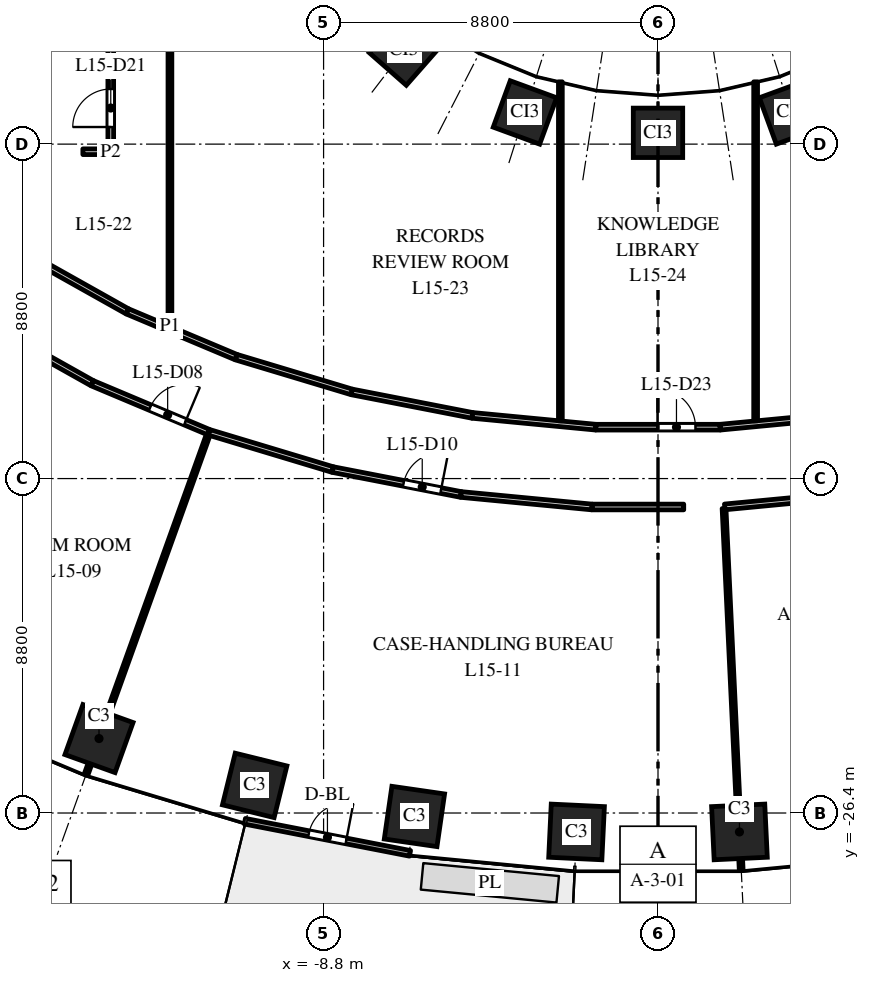
"""IFC4 building model, lengths in metres.
Left out: names, types, materials, properties, quantities, classifications, styles, units other than length and angle.
Written with IfcOpenShell. Run it as: python <this file> out.ifc"""

import sys

from ifc_helpers import new_model, si_unit, direction, frame, frame_2d, origin, origin_2d, place, context, subcontext, project, spatial, rectangle, extrude, element, fill, save


model = new_model("IFC4")
c1 = context("Model", 3, precision=1e-05, world=origin(), true_north=direction((0.0, 1.0)))
c2 = subcontext(c1, "Body", "Model", "MODEL_VIEW")
j1 = project(units=[si_unit("LENGTHUNIT", "METRE"), si_unit("PLANEANGLEUNIT", "RADIAN")], contexts=[c1])
p1 = place(None, origin())
s1 = spatial("IfcSite", under=j1, at=p1, CompositionType="ELEMENT")
p2 = place(p1, origin())
s2 = spatial("IfcBuilding", under=s1, at=p2, CompositionType="ELEMENT")
p3 = place(p2, frame((0.0, 0.0, 70.5)))
s3 = spatial("IfcBuildingStorey", under=s2, at=p3, CompositionType="ELEMENT", Elevation=70.5)
for number, where, z_axis, x_axis in (
    (1, (-14.709, -24.441, 0.0), (0.0, 0.0, 1.0), (0.941, -0.338, 0.0)),
    (2, (-10.613, -25.674, 0.0), (0.0, 0.0, 1.0), (0.971, -0.24, 0.0)),
    (3, (-6.409, -26.491, 0.0), (0.0, 0.0, 1.0), (0.99, -0.143, 0.0)),
    (4, (-2.143, -26.898, 0.0), (0.0, 0.0, 1.0), (0.999, -0.048, 0.0)),
    (5, (2.143, -26.898, 0.0), (0.0, 0.0, 1.0), (0.999, 0.048, 0.0)),
):
    element("IfcColumn", number, at=place(p3, frame(where, z_axis=z_axis, x_axis=x_axis)), inside=s3, PredefinedType="COLUMN", context=c2, shape_type="SweptSolid", body=[
        extrude(rectangle(XDim=1.4, YDim=1.4, at=origin_2d()), origin(), (0.0, 0.0, 1.0), 4.0),
    ])
for number, where, z_axis, x_axis in (
    (6, (-6.682, -6.334, 0.0), (0.0, 0.0, 1.0), (0.751, -0.66, 0.0)),
    (7, (-3.501, -7.967, 0.0), (0.0, 0.0, 1.0), (0.939, -0.344, 0.0)),
    (8, (0.0, -8.503, 0.0), (0.0, 0.0, 1.0), (1.0, 0.0, 0.0)),
    (9, (3.501, -7.967, 0.0), (0.0, 0.0, 1.0), (0.939, 0.344, 0.0)),
):
    element("IfcColumn", number, at=place(p3, frame(where, z_axis=z_axis, x_axis=x_axis)), inside=s3, PredefinedType="COLUMN", context=c2, shape_type="SweptSolid", body=[
        extrude(rectangle(XDim=1.3, YDim=1.3, at=origin_2d()), origin(), (0.0, 0.0, 1.0), 4.0),
    ])
p4 = place(p3, frame((-10.871, -26.617, 0.0), z_axis=(0.0, 0.0, 1.0), x_axis=(0.981631174778, -0.190788460615, 0.0)))
e10 = element("IfcWall", 10, at=p4, inside=s3, PredefinedType="STANDARD", context=c2, shape_type="SweptSolid", body=[
    extrude(rectangle(XDim=4.426, YDim=0.15, at=frame_2d((2.213, 0.0))), origin(), (0.0, 0.0, 1.0), 3.7),
])
p5 = place(p4, frame((1.713, 0.0, 0.0)))
e11 = element("IfcOpeningElement", 11, at=p5, cuts=e10, PredefinedType="OPENING", context=c2, shape_type="SweptSolid", body=[
    extrude(rectangle(XDim=1.0, YDim=2.4, at=frame_2d((0.5, 1.2))), frame((0.0, 0.085, 0.0), z_axis=(0.0, -1.0, 0.0), x_axis=(1.0, 0.0, 0.0)), (0.0, 0.0, 1.0), 0.17),
])
p6 = place(p3, frame((-17.699, -13.513, 0.0), z_axis=(0.0, 0.0, 1.0), x_axis=(0.872072163686, -0.489377299559, 0.0)))
e12 = element("IfcWall", 12, at=p6, inside=s3, PredefinedType="PARTITIONING", context=c2, shape_type="SweptSolid", body=[
    extrude(rectangle(XDim=3.227, YDim=0.15, at=frame_2d((1.613, 0.0))), origin(), (0.0, 0.0, 1.0), 3.7),
])
p7 = place(p3, frame((-16.576, -11.735, 0.0), z_axis=(0.0, 0.0, 1.0), x_axis=(0.872164226045, -0.489213207924, 0.0)))
e13 = element("IfcWall", 13, at=p7, inside=s3, PredefinedType="PARTITIONING", context=c2, shape_type="SweptSolid", body=[
    extrude(rectangle(XDim=2.998, YDim=0.15, at=frame_2d((1.499, 0.0))), origin(), (0.0, 0.0, 1.0), 2.75),
])
p8 = place(p3, frame((-15.134, -9.0, 0.0), z_axis=(0.0, 0.0, 1.0), x_axis=(1.0, 0.0, 0.0)))
e14 = element("IfcWall", 14, at=p8, inside=s3, PredefinedType="PARTITIONING", context=c2, shape_type="SweptSolid", body=[
    extrude(rectangle(XDim=0.734, YDim=0.15, at=frame_2d((0.367, 0.0))), origin(), (0.0, 0.0, 1.0), 3.7),
])
p9 = place(p3, frame((-15.048, -25.383, 0.0), z_axis=(0.0, 0.0, 1.0), x_axis=(0.338338680362, 0.941024408488, 0.0)))
e15 = element("IfcWall", 15, at=p9, inside=s3, PredefinedType="PARTITIONING", context=c2, shape_type="SweptSolid", body=[
    extrude(rectangle(XDim=9.559, YDim=0.1, at=frame_2d((4.779, 0.0))), origin(), (0.0, 0.0, 1.0), 2.85),
])
p10 = place(p3, frame((-14.885, -15.092, 0.0), z_axis=(0.0, 0.0, 1.0), x_axis=(0.921844706698, -0.387559462189, 0.0)))
e16 = element("IfcWall", 16, at=p10, inside=s3, PredefinedType="PARTITIONING", context=c2, shape_type="SweptSolid", body=[
    extrude(rectangle(XDim=3.313, YDim=0.15, at=frame_2d((1.656, 0.0))), origin(), (0.0, 0.0, 1.0), 2.85),
])
p11 = place(p10, frame((1.65, 0.0, 0.0)))
e17 = element("IfcOpeningElement", 17, at=p11, cuts=e16, PredefinedType="OPENING", context=c2, shape_type="SweptSolid", body=[
    extrude(rectangle(XDim=1.0, YDim=2.1, at=frame_2d((0.5, 1.05))), frame((0.0, 0.085, 0.0), z_axis=(0.0, -1.0, 0.0), x_axis=(1.0, 0.0, 0.0)), (0.0, 0.0, 1.0), 0.17),
])
p12 = place(p3, frame((-14.4, -9.0, 0.0), z_axis=(0.0, 0.0, 1.0), x_axis=(0.0, 1.0, 0.0)))
e18 = element("IfcWall", 18, at=p12, inside=s3, PredefinedType="PARTITIONING", context=c2, shape_type="SweptSolid", body=[
    extrude(rectangle(XDim=18.0, YDim=0.15, at=frame_2d((9.0, 0.0))), origin(), (0.0, 0.0, 1.0), 3.7),
])
p13 = place(p12, frame((0.65, 0.0, 0.0)))
e19 = element("IfcOpeningElement", 19, at=p13, cuts=e18, PredefinedType="OPENING", context=c2, shape_type="SweptSolid", body=[
    extrude(rectangle(XDim=1.0, YDim=2.1, at=frame_2d((0.5, 1.05))), frame((0.0, 0.085, 0.0), z_axis=(0.0, -1.0, 0.0), x_axis=(1.0, 0.0, 0.0)), (0.0, 0.0, 1.0), 0.17),
])
p14 = place(p3, frame((-13.961, -13.202, 0.0), z_axis=(0.0, 0.0, 1.0), x_axis=(0.921753827375, -0.387775555857, 0.0)))
e20 = element("IfcWall", 20, at=p14, inside=s3, PredefinedType="PARTITIONING", context=c2, shape_type="SweptSolid", body=[
    extrude(rectangle(XDim=3.103, YDim=0.15, at=frame_2d((1.551, 0.0))), origin(), (0.0, 0.0, 1.0), 2.85),
])
p15 = place(p3, frame((-12.843, -13.587, 0.0), z_axis=(0.0, 0.0, 1.0), x_axis=(0.0, 1.0, 0.0)))
e21 = element("IfcWall", 21, at=p15, inside=s3, PredefinedType="PARTITIONING", context=c2, shape_type="SweptSolid", body=[
    extrude(rectangle(XDim=27.174, YDim=0.1, at=frame_2d((13.587, 0.0))), origin(), (0.0, 0.0, 1.0), 2.75),
])
p16 = place(p3, frame((-11.812, -16.384, 0.0), z_axis=(0.0, 0.0, 1.0), x_axis=(0.95754884035, -0.28827108482, 0.0)))
e22 = element("IfcWall", 22, at=p16, inside=s3, PredefinedType="PARTITIONING", context=c2, shape_type="SweptSolid", body=[
    extrude(rectangle(XDim=3.396, YDim=0.15, at=frame_2d((1.698, 0.0))), origin(), (0.0, 0.0, 1.0), 3.7),
])
p17 = place(p3, frame((-11.101, -14.405, 0.0), z_axis=(0.0, 0.0, 1.0), x_axis=(0.957612601062, -0.28805920622, 0.0)))
e23 = element("IfcWall", 23, at=p17, inside=s3, PredefinedType="PARTITIONING", context=c2, shape_type="SweptSolid", body=[
    extrude(rectangle(XDim=3.18, YDim=0.15, at=frame_2d((1.59, 0.0))), origin(), (0.0, 0.0, 1.0), 3.7),
])
p18 = place(p3, frame((-8.56, -17.363, 0.0), z_axis=(0.0, 0.0, 1.0), x_axis=(0.981639027618, -0.1907480523, 0.0)))
e24 = element("IfcWall", 24, at=p18, inside=s3, PredefinedType="PARTITIONING", context=c2, shape_type="SweptSolid", body=[
    extrude(rectangle(XDim=3.439, YDim=0.15, at=frame_2d((1.72, 0.0))), origin(), (0.0, 0.0, 1.0), 2.85),
])
p19 = place(p18, frame((1.9, 0.0, 0.0)))
e25 = element("IfcOpeningElement", 25, at=p19, cuts=e24, PredefinedType="OPENING", context=c2, shape_type="SweptSolid", body=[
    extrude(rectangle(XDim=1.0, YDim=2.1, at=frame_2d((0.5, 1.05))), frame((0.0, 0.085, 0.0), z_axis=(0.0, -1.0, 0.0), x_axis=(1.0, 0.0, 0.0)), (0.0, 0.0, 1.0), 0.17),
])
p20 = place(p3, frame((-8.056, -15.321, 0.0), z_axis=(0.0, 0.0, 1.0), x_axis=(0.981604377859, -0.190926282547, 0.0)))
e26 = element("IfcWall", 26, at=p20, inside=s3, PredefinedType="PARTITIONING", context=c2, shape_type="SweptSolid", body=[
    extrude(rectangle(XDim=3.231, YDim=0.15, at=frame_2d((1.616, 0.0))), origin(), (0.0, 0.0, 1.0), 2.85),
])
p21 = place(p3, frame((-5.184, -18.019, 0.0), z_axis=(0.0, 0.0, 1.0), x_axis=(0.995482474707, -0.09494547146, 0.0)))
e27 = element("IfcWall", 27, at=p21, inside=s3, PredefinedType="PARTITIONING", context=c2, shape_type="SweptSolid", body=[
    extrude(rectangle(XDim=3.464, YDim=0.15, at=frame_2d((1.732, 0.0))), origin(), (0.0, 0.0, 1.0), 3.7),
])
p22 = place(p3, frame((-4.884, -15.938, 0.0), z_axis=(0.0, 0.0, 1.0), x_axis=(0.99547459835, -0.095028017131, 0.0)))
e28 = element("IfcWall", 28, at=p22, inside=s3, PredefinedType="PARTITIONING", context=c2, shape_type="SweptSolid", body=[
    extrude(rectangle(XDim=3.263, YDim=0.15, at=frame_2d((1.631, 0.0))), origin(), (0.0, 0.0, 1.0), 3.7),
])
p23 = place(p3, frame((-2.569, -16.08, 0.0), z_axis=(0.0, 0.0, 1.0), x_axis=(0.0, 1.0, 0.0)))
e29 = element("IfcWall", 29, at=p23, inside=s3, PredefinedType="PARTITIONING", context=c2, shape_type="SweptSolid", body=[
    extrude(rectangle(XDim=8.919, YDim=0.1, at=frame_2d((4.459, 0.0))), origin(), (0.0, 0.0, 1.0), 2.85),
])
p24 = place(p3, frame((-1.736, -18.348, 0.0), z_axis=(0.0, 0.0, 1.0), x_axis=(1.0, 0.0, 0.0)))
e30 = element("IfcWall", 30, at=p24, inside=s3, PredefinedType="PARTITIONING", context=c2, shape_type="SweptSolid", body=[
    extrude(rectangle(XDim=2.413, YDim=0.15, at=frame_2d((1.207, 0.0))), origin(), (0.0, 0.0, 1.0), 2.85),
])
p25 = place(p3, frame((-1.636, -16.248, 0.0), z_axis=(0.0, 0.0, 1.0), x_axis=(1.0, 0.0, 0.0)))
e31 = element("IfcWall", 31, at=p25, inside=s3, PredefinedType="PARTITIONING", context=c2, shape_type="SweptSolid", body=[
    extrude(rectangle(XDim=3.272, YDim=0.15, at=frame_2d((1.636, 0.0))), origin(), (0.0, 0.0, 1.0), 2.85),
])
p26 = place(p25, frame((1.622, 0.0, 0.0)))
e32 = element("IfcOpeningElement", 32, at=p26, cuts=e31, PredefinedType="OPENING", context=c2, shape_type="SweptSolid", body=[
    extrude(rectangle(XDim=1.0, YDim=2.1, at=frame_2d((0.5, 1.05))), frame((0.0, 0.085, 0.0), z_axis=(0.0, -1.0, 0.0), x_axis=(1.0, 0.0, 0.0)), (0.0, 0.0, 1.0), 0.17),
])
p27 = place(p3, frame((1.636, -16.248, 0.0), z_axis=(0.0, 0.0, 1.0), x_axis=(0.99547459835, 0.095028017131, 0.0)))
e33 = element("IfcWall", 33, at=p27, inside=s3, PredefinedType="PARTITIONING", context=c2, shape_type="SweptSolid", body=[
    extrude(rectangle(XDim=3.263, YDim=0.15, at=frame_2d((1.631, 0.0))), origin(), (0.0, 0.0, 1.0), 2.85),
])
p28 = place(p3, frame((1.738, -18.387, 0.0), z_axis=(0.0, 0.0, 1.0), x_axis=(0.047358051836, -0.998877977996, 0.0)))
e34 = element("IfcWall", 34, at=p28, inside=s3, PredefinedType="PARTITIONING", context=c2, shape_type="SweptSolid", body=[
    extrude(rectangle(XDim=9.522, YDim=0.1, at=frame_2d((4.761, 0.0))), origin(), (0.0, 0.0, 1.0), 2.85),
])
p29 = place(p3, frame((1.756, -18.346, 0.0), z_axis=(0.0, 0.0, 1.0), x_axis=(0.99548367506, 0.094932885187, 0.0)))
e35 = element("IfcWall", 35, at=p29, inside=s3, PredefinedType="PARTITIONING", context=c2, shape_type="SweptSolid", body=[
    extrude(rectangle(XDim=3.444, YDim=0.15, at=frame_2d((1.722, 0.0))), origin(), (0.0, 0.0, 1.0), 2.85),
])
p30 = place(p3, frame((2.569, -16.08, 0.0), z_axis=(0.0, 0.0, 1.0), x_axis=(0.0, 1.0, 0.0)))
e36 = element("IfcWall", 36, at=p30, inside=s3, PredefinedType="PARTITIONING", context=c2, shape_type="SweptSolid", body=[
    extrude(rectangle(XDim=8.919, YDim=0.1, at=frame_2d((4.459, 0.0))), origin(), (0.0, 0.0, 1.0), 2.85),
])
p31 = place(p5, origin())
e37 = element("IfcDoor", 37, at=p31, inside=s3, OperationType="SINGLE_SWING_RIGHT", PredefinedType="DOOR", context=c2, shape_type="SweptSolid", body=[
    extrude(rectangle(XDim=1.0, YDim=2.4, at=frame_2d((0.5, 1.2))), frame((0.0, 0.025, 0.0), z_axis=(0.0, -1.0, 0.0), x_axis=(1.0, 0.0, 0.0)), (0.0, 0.0, 1.0), 0.05),
])
fill(e11, e37)
p32 = place(p11, origin())
e38 = element("IfcDoor", 38, at=p32, inside=s3, OperationType="SINGLE_SWING_RIGHT", PredefinedType="DOOR", context=c2, shape_type="SweptSolid", body=[
    extrude(rectangle(XDim=1.0, YDim=2.1, at=frame_2d((0.5, 1.05))), frame((0.0, 0.025, 0.0), z_axis=(0.0, -1.0, 0.0), x_axis=(1.0, 0.0, 0.0)), (0.0, 0.0, 1.0), 0.05),
])
fill(e17, e38)
p33 = place(p19, origin())
e39 = element("IfcDoor", 39, at=p33, inside=s3, OperationType="SINGLE_SWING_RIGHT", PredefinedType="DOOR", context=c2, shape_type="SweptSolid", body=[
    extrude(rectangle(XDim=1.0, YDim=2.1, at=frame_2d((0.5, 1.05))), frame((0.0, 0.025, 0.0), z_axis=(0.0, -1.0, 0.0), x_axis=(1.0, 0.0, 0.0)), (0.0, 0.0, 1.0), 0.05),
])
fill(e25, e39)
p34 = place(p13, origin())
e40 = element("IfcDoor", 40, at=p34, inside=s3, OperationType="SINGLE_SWING_LEFT", PredefinedType="DOOR", context=c2, shape_type="SweptSolid", body=[
    extrude(rectangle(XDim=1.0, YDim=2.1, at=frame_2d((0.5, 1.05))), frame((0.0, 0.025, 0.0), z_axis=(0.0, -1.0, 0.0), x_axis=(1.0, 0.0, 0.0)), (0.0, 0.0, 1.0), 0.05),
])
fill(e19, e40)
p35 = place(p26, origin())
e41 = element("IfcDoor", 41, at=p35, inside=s3, OperationType="SINGLE_SWING_LEFT", PredefinedType="DOOR", context=c2, shape_type="SweptSolid", body=[
    extrude(rectangle(XDim=1.0, YDim=2.1, at=frame_2d((0.5, 1.05))), frame((0.0, 0.025, 0.0), z_axis=(0.0, -1.0, 0.0), x_axis=(1.0, 0.0, 0.0)), (0.0, 0.0, 1.0), 0.05),
])
fill(e32, e41)
save(model, sys.argv[1])
